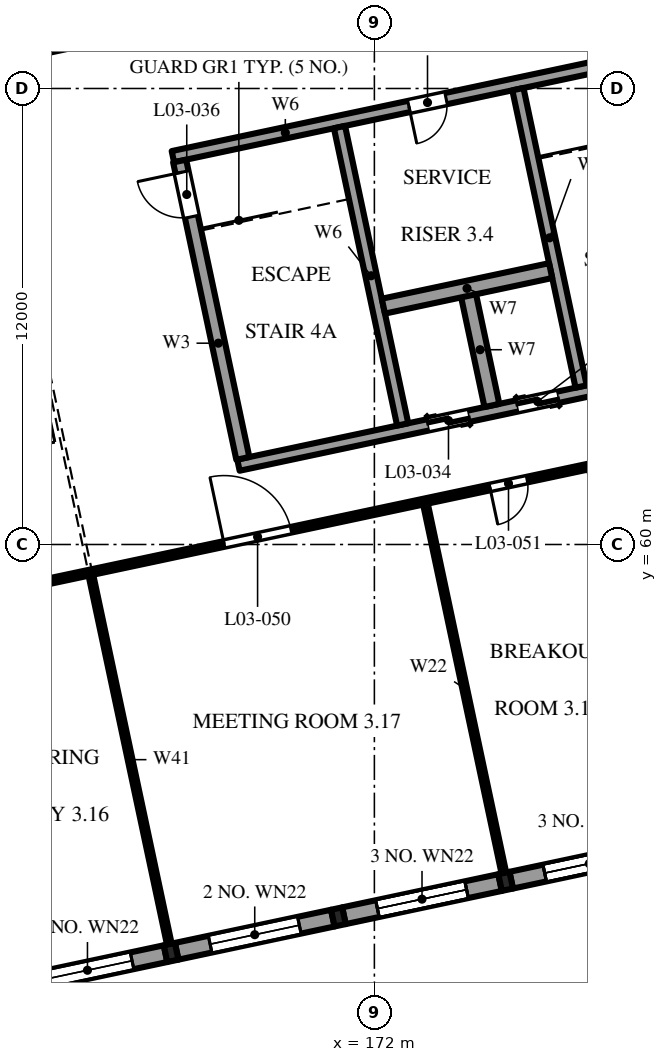
"""IFC4 building model, lengths in metres.
Left out: names, types, materials, properties, quantities, classifications, styles, units other than length and angle.
Written with IfcOpenShell. Run it as: python <this file> out.ifc"""

import sys

from ifc_helpers import new_model, si_unit, direction, frame, frame_2d, origin, origin_2d, place, context, subcontext, project, spatial, polyline, rectangle, i_section, outline, extrude, element, fill, save


model = new_model("IFC4")
c1 = context("Model", 3, precision=1e-05, world=origin(), true_north=direction((0.0, 1.0)))
c2 = subcontext(c1, "Body", "Model", "MODEL_VIEW")
j1 = project(units=[si_unit("LENGTHUNIT", "METRE"), si_unit("PLANEANGLEUNIT", "RADIAN")], contexts=[c1])
p1 = place(None, origin())
s1 = spatial("IfcSite", under=j1, at=p1, CompositionType="ELEMENT")
p2 = place(p1, origin())
s2 = spatial("IfcBuilding", under=s1, at=p2, CompositionType="ELEMENT")
p3 = place(p2, frame((0.0, 0.0, 16.8)))
s3 = spatial("IfcBuildingStorey", under=s2, at=p3, CompositionType="ELEMENT", Elevation=16.8)
for number, where, z_axis, x_axis in (
    (1, (166.651, 49.264, 0.0), (0.0, 0.0, 1.0), (0.978, 0.208, 0.0)),
    (2, (171.052, 50.199, 0.0), (0.0, 0.0, 1.0), (0.978, 0.208, 0.0)),
    (3, (175.454, 51.135, 0.0), (0.0, 0.0, 1.0), (0.978, 0.208, 0.0)),
):
    element("IfcColumn", number, at=place(p3, frame(where, z_axis=z_axis, x_axis=x_axis)), inside=s3, PredefinedType="COLUMN", context=c2, shape_type="SweptSolid", body=[
        extrude(i_section(OverallWidth=0.3, OverallDepth=0.45, WebThickness=0.014, FlangeThickness=0.026, FilletRadius=0.027, at=origin_2d()), origin(), (0.0, 0.0, 1.0), 4.8),
    ])
p4 = place(p3, frame((166.698, 70.206, 0.0), z_axis=(0.0, 0.0, 1.0), x_axis=(0.978147662755, 0.20791139903, 0.0)))
e4 = element("IfcWall", 4, at=p4, inside=s3, PredefinedType="SHEAR", context=c2, shape_type="SweptSolid", body=[
    extrude(outline(polyline([(0.0, 0.0), (13.7, 0.0), (13.7, 12.494), (0.0, 11.761), (0.0, 0.0)])), frame((0.0, 0.15, 0.0), z_axis=(0.0, -1.0, 0.0), x_axis=(1.0, 0.0, 0.0)), (0.0, 0.0, 1.0), 0.3),
])
p5 = place(p4, frame((6.35, 0.0, 0.0)))
e5 = element("IfcOpeningElement", 5, at=p5, cuts=e4, PredefinedType="OPENING", context=c2, shape_type="SweptSolid", body=[
    extrude(rectangle(XDim=1.0, YDim=2.1, at=frame_2d((0.5, 1.05))), frame((0.0, 0.16, 0.0), z_axis=(0.0, -1.0, 0.0), x_axis=(1.0, 0.0, 0.0)), (0.0, 0.0, 1.0), 0.32),
])
p6 = place(p3, frame((168.423, 62.087, 0.0), z_axis=(0.0, 0.0, 1.0), x_axis=(0.978147662755, 0.20791139903, 0.0)))
e6 = element("IfcWall", 6, at=p6, inside=s3, PredefinedType="SHEAR", context=c2, shape_type="SweptSolid", body=[
    extrude(outline(polyline([(0.0, 0.0), (13.7, 0.0), (13.7, 12.929), (0.0, 12.196), (0.0, 0.0)])), frame((0.0, 0.15, 0.0), z_axis=(0.0, -1.0, 0.0), x_axis=(1.0, 0.0, 0.0)), (0.0, 0.0, 1.0), 0.3),
])
p7 = place(p6, frame((5.1, 0.0, 0.0)))
e7 = element("IfcOpeningElement", 7, at=p7, cuts=e6, PredefinedType="OPENING", context=c2, shape_type="SweptSolid", body=[
    extrude(rectangle(XDim=1.1, YDim=2.1, at=frame_2d((0.55, 1.05))), frame((0.0, 0.16, 0.0), z_axis=(0.0, -1.0, 0.0), x_axis=(1.0, 0.0, 0.0)), (0.0, 0.0, 1.0), 0.32),
])
p8 = place(p6, frame((7.5, 0.0, 0.0)))
e8 = element("IfcOpeningElement", 8, at=p8, cuts=e6, PredefinedType="OPENING", context=c2, shape_type="SweptSolid", body=[
    extrude(rectangle(XDim=1.1, YDim=2.1, at=frame_2d((0.55, 1.05))), frame((0.0, 0.16, 0.0), z_axis=(0.0, -1.0, 0.0), x_axis=(1.0, 0.0, 0.0)), (0.0, 0.0, 1.0), 0.32),
])
p9 = place(p3, frame((166.876, 70.091, 0.0), z_axis=(0.0, 0.0, 1.0), x_axis=(0.207915693476, -0.978146749934, 0.0)))
e9 = element("IfcWall", 9, at=p9, inside=s3, PredefinedType="SOLIDWALL", context=c2, shape_type="SweptSolid", body=[
    extrude(outline(polyline([(0.0, 0.0), (8.0, 0.0), (8.0, 12.196), (0.0, 11.777), (0.0, 0.0)])), frame((0.0, 0.175, 0.0), z_axis=(0.0, -1.0, 0.0), x_axis=(1.0, 0.0, 0.0)), (0.0, 0.0, 1.0), 0.35),
])
p10 = place(p9, frame((0.3, 0.0, 0.0)))
e10 = element("IfcOpeningElement", 10, at=p10, cuts=e9, PredefinedType="OPENING", context=c2, shape_type="SweptSolid", body=[
    extrude(rectangle(XDim=1.2, YDim=2.1, at=frame_2d((0.6, 1.05))), frame((0.0, 0.185, 0.0), z_axis=(0.0, -1.0, 0.0), x_axis=(1.0, 0.0, 0.0)), (0.0, 0.0, 1.0), 0.37),
])
p11 = place(p3, frame((171.082, 70.985, 0.0), z_axis=(0.0, 0.0, 1.0), x_axis=(0.207915693476, -0.978146749934, 0.0)))
e11 = element("IfcWall", 11, at=p11, inside=s3, PredefinedType="SHEAR", context=c2, shape_type="SweptSolid", body=[
    extrude(outline(polyline([(0.0, 0.0), (8.0, 0.0), (8.0, 12.426), (0.0, 12.007), (0.0, 0.0)])), frame((0.0, 0.15, 0.0), z_axis=(0.0, -1.0, 0.0), x_axis=(1.0, 0.0, 0.0)), (0.0, 0.0, 1.0), 0.3),
])
p12 = place(p3, frame((175.777, 71.983, 0.0), z_axis=(0.0, 0.0, 1.0), x_axis=(0.207915693476, -0.978146749934, 0.0)))
e12 = element("IfcWall", 12, at=p12, inside=s3, PredefinedType="SHEAR", context=c2, shape_type="SweptSolid", body=[
    extrude(outline(polyline([(0.0, 0.0), (8.0, 0.0), (8.0, 12.683), (0.0, 12.264), (0.0, 0.0)])), frame((0.0, 0.15, 0.0), z_axis=(0.0, -1.0, 0.0), x_axis=(1.0, 0.0, 0.0)), (0.0, 0.0, 1.0), 0.3),
])
p13 = place(p3, frame((174.469, 66.593, 0.0), z_axis=(0.0, 0.0, 1.0), x_axis=(0.207933702079, -0.978142921837, 0.0)))
e13 = element("IfcWall", 13, at=p13, inside=s3, PredefinedType="SHEAR", context=c2, shape_type="SweptSolid", body=[
    extrude(outline(polyline([(0.0, 0.0), (3.0, 0.0), (3.0, 12.554), (0.0, 12.397), (0.0, 0.0)])), frame((0.0, 0.2, 0.0), z_axis=(0.0, -1.0, 0.0), x_axis=(1.0, 0.0, 0.0)), (0.0, 0.0, 1.0), 0.4),
])
p14 = place(p3, frame((172.237, 66.272, 0.0), z_axis=(0.0, 0.0, 1.0), x_axis=(0.978149611564, 0.20790223038, 0.0)))
e14 = element("IfcWall", 14, at=p14, inside=s3, PredefinedType="SHEAR", context=c2, shape_type="SweptSolid", body=[
    extrude(outline(polyline([(0.0, 0.0), (4.5, 0.0), (4.5, 12.51), (0.0, 12.269), (0.0, 0.0)])), frame((0.0, 0.2, 0.0), z_axis=(0.0, -1.0, 0.0), x_axis=(1.0, 0.0, 0.0)), (0.0, 0.0, 1.0), 0.4),
])
p15 = place(p3, frame((162.396, 48.359, 0.0), z_axis=(0.0, 0.0, 1.0), x_axis=(0.978155748334, 0.207873355681, 0.0)))
e15 = element("IfcWall", 15, at=p15, inside=s3, PredefinedType="SOLIDWALL", context=c2, shape_type="SweptSolid", body=[
    extrude(outline(polyline([(0.0, 0.0), (4.2, 0.0), (4.2, 13.89), (0.0, 13.666), (0.0, 0.0)])), frame((0.0, 0.225, 0.0), z_axis=(0.0, -1.0, 0.0), x_axis=(1.0, 0.0, 0.0)), (0.0, 0.0, 1.0), 0.45),
])
p16 = place(p15, frame((0.9, 0.0, 0.9)))
e16 = element("IfcOpeningElement", 16, at=p16, cuts=e15, PredefinedType="OPENING", context=c2, shape_type="SweptSolid", body=[
    extrude(rectangle(XDim=2.4, YDim=2.4, at=frame_2d((1.2, 1.2))), frame((0.0, 0.235, 0.0), z_axis=(0.0, -1.0, 0.0), x_axis=(1.0, 0.0, 0.0)), (0.0, 0.0, 1.0), 0.47),
])
p17 = place(p15, frame((0.9, 0.0, 5.1)))
e17 = element("IfcOpeningElement", 17, at=p17, cuts=e15, PredefinedType="OPENING", context=c2, shape_type="SweptSolid", body=[
    extrude(rectangle(XDim=2.4, YDim=2.4, at=frame_2d((1.2, 1.2))), frame((0.0, 0.235, 0.0), z_axis=(0.0, -1.0, 0.0), x_axis=(1.0, 0.0, 0.0)), (0.0, 0.0, 1.0), 0.47),
])
p18 = place(p3, frame((166.798, 49.295, 0.0), z_axis=(0.0, 0.0, 1.0), x_axis=(0.978143927149, 0.207928972925, 0.0)))
e18 = element("IfcWall", 18, at=p18, inside=s3, PredefinedType="SOLIDWALL", context=c2, shape_type="SweptSolid", body=[
    extrude(outline(polyline([(0.0, 0.0), (4.2, 0.0), (4.2, 14.131), (0.0, 13.906), (0.0, 0.0)])), frame((0.0, 0.225, 0.0), z_axis=(0.0, -1.0, 0.0), x_axis=(1.0, 0.0, 0.0)), (0.0, 0.0, 1.0), 0.45),
])
p19 = place(p18, frame((0.9, 0.0, 0.9)))
e19 = element("IfcOpeningElement", 19, at=p19, cuts=e18, PredefinedType="OPENING", context=c2, shape_type="SweptSolid", body=[
    extrude(rectangle(XDim=2.4, YDim=2.4, at=frame_2d((1.2, 1.2))), frame((0.0, 0.235, 0.0), z_axis=(0.0, -1.0, 0.0), x_axis=(1.0, 0.0, 0.0)), (0.0, 0.0, 1.0), 0.47),
])
p20 = place(p18, frame((0.9, 0.0, 5.1)))
e20 = element("IfcOpeningElement", 20, at=p20, cuts=e18, PredefinedType="OPENING", context=c2, shape_type="SweptSolid", body=[
    extrude(rectangle(XDim=2.4, YDim=2.4, at=frame_2d((1.2, 1.2))), frame((0.0, 0.235, 0.0), z_axis=(0.0, -1.0, 0.0), x_axis=(1.0, 0.0, 0.0)), (0.0, 0.0, 1.0), 0.47),
])
p21 = place(p3, frame((171.199, 50.23, 0.0), z_axis=(0.0, 0.0, 1.0), x_axis=(0.978146440129, 0.207917150959, 0.0)))
e21 = element("IfcWall", 21, at=p21, inside=s3, PredefinedType="SOLIDWALL", context=c2, shape_type="SweptSolid", body=[
    extrude(outline(polyline([(0.0, 0.0), (4.2, 0.0), (4.2, 14.372), (0.0, 14.147), (0.0, 0.0)])), frame((0.0, 0.225, 0.0), z_axis=(0.0, -1.0, 0.0), x_axis=(1.0, 0.0, 0.0)), (0.0, 0.0, 1.0), 0.45),
])
p22 = place(p21, frame((0.9, 0.0, 0.9)))
e22 = element("IfcOpeningElement", 22, at=p22, cuts=e21, PredefinedType="OPENING", context=c2, shape_type="SweptSolid", body=[
    extrude(rectangle(XDim=2.4, YDim=2.4, at=frame_2d((1.2, 1.2))), frame((0.0, 0.235, 0.0), z_axis=(0.0, -1.0, 0.0), x_axis=(1.0, 0.0, 0.0)), (0.0, 0.0, 1.0), 0.47),
])
p23 = place(p21, frame((0.9, 0.0, 5.1)))
e23 = element("IfcOpeningElement", 23, at=p23, cuts=e21, PredefinedType="OPENING", context=c2, shape_type="SweptSolid", body=[
    extrude(rectangle(XDim=2.4, YDim=2.4, at=frame_2d((1.2, 1.2))), frame((0.0, 0.235, 0.0), z_axis=(0.0, -1.0, 0.0), x_axis=(1.0, 0.0, 0.0)), (0.0, 0.0, 1.0), 0.47),
])
p24 = place(p21, frame((0.9, 0.0, 9.3)))
e24 = element("IfcOpeningElement", 24, at=p24, cuts=e21, PredefinedType="OPENING", context=c2, shape_type="SweptSolid", body=[
    extrude(rectangle(XDim=2.4, YDim=2.4, at=frame_2d((1.2, 1.2))), frame((0.0, 0.235, 0.0), z_axis=(0.0, -1.0, 0.0), x_axis=(1.0, 0.0, 0.0)), (0.0, 0.0, 1.0), 0.47),
])
p25 = place(p3, frame((175.601, 51.166, 0.0), z_axis=(0.0, 0.0, 1.0), x_axis=(0.978143927149, 0.207928972925, 0.0)))
e25 = element("IfcWall", 25, at=p25, inside=s3, PredefinedType="SOLIDWALL", context=c2, shape_type="SweptSolid", body=[
    extrude(outline(polyline([(0.0, 0.0), (4.2, 0.0), (4.2, 14.613), (0.0, 14.388), (0.0, 0.0)])), frame((0.0, 0.225, 0.0), z_axis=(0.0, -1.0, 0.0), x_axis=(1.0, 0.0, 0.0)), (0.0, 0.0, 1.0), 0.45),
])
p26 = place(p25, frame((0.9, 0.0, 0.9)))
e26 = element("IfcOpeningElement", 26, at=p26, cuts=e25, PredefinedType="OPENING", context=c2, shape_type="SweptSolid", body=[
    extrude(rectangle(XDim=2.4, YDim=2.4, at=frame_2d((1.2, 1.2))), frame((0.0, 0.235, 0.0), z_axis=(0.0, -1.0, 0.0), x_axis=(1.0, 0.0, 0.0)), (0.0, 0.0, 1.0), 0.47),
])
p27 = place(p25, frame((0.9, 0.0, 5.1)))
e27 = element("IfcOpeningElement", 27, at=p27, cuts=e25, PredefinedType="OPENING", context=c2, shape_type="SweptSolid", body=[
    extrude(rectangle(XDim=2.4, YDim=2.4, at=frame_2d((1.2, 1.2))), frame((0.0, 0.235, 0.0), z_axis=(0.0, -1.0, 0.0), x_axis=(1.0, 0.0, 0.0)), (0.0, 0.0, 1.0), 0.47),
])
p28 = place(p25, frame((0.9, 0.0, 9.3)))
e28 = element("IfcOpeningElement", 28, at=p28, cuts=e25, PredefinedType="OPENING", context=c2, shape_type="SweptSolid", body=[
    extrude(rectangle(XDim=2.4, YDim=2.4, at=frame_2d((1.2, 1.2))), frame((0.0, 0.235, 0.0), z_axis=(0.0, -1.0, 0.0), x_axis=(1.0, 0.0, 0.0)), (0.0, 0.0, 1.0), 0.47),
])
p29 = place(p3, frame((161.808, 72.771, 0.0), z_axis=(0.0, 0.0, 1.0), x_axis=(0.978155748334, 0.207873355681, 0.0)))
e29 = element("IfcWall", 29, at=p29, inside=s3, PredefinedType="SOLIDWALL", context=c2, shape_type="SweptSolid", body=[
    extrude(outline(polyline([(0.0, 0.0), (4.2, 0.0), (4.2, 12.874), (0.0, 12.649), (0.0, 0.0)])), frame((0.0, 0.175, 0.0), z_axis=(0.0, -1.0, 0.0), x_axis=(1.0, 0.0, 0.0)), (0.0, 0.0, 1.0), 0.35),
])
p30 = place(p3, frame((151.32, 56.458, 0.0), z_axis=(0.0, 0.0, 1.0), x_axis=(0.97814787394, 0.207910405482, 0.0)))
e30 = element("IfcWall", 30, at=p30, inside=s3, PredefinedType="PARTITIONING", context=c2, shape_type="SweptSolid", body=[
    extrude(outline(polyline([(0.0, 0.0), (45.0, 0.0), (45.0, 12.948), (0.0, 10.54), (0.0, 0.0)])), frame((0.0, 0.075, 0.0), z_axis=(0.0, -1.0, 0.0), x_axis=(1.0, 0.0, 0.0)), (0.0, 0.0, 1.0), 0.15),
])
p31 = place(p30, frame((3.6, 0.0, 0.0)))
e31 = element("IfcOpeningElement", 31, at=p31, cuts=e30, PredefinedType="OPENING", context=c2, shape_type="SweptSolid", body=[
    extrude(rectangle(XDim=1.8, YDim=2.1, at=frame_2d((0.9, 1.05))), frame((0.0, 0.085, 0.0), z_axis=(0.0, -1.0, 0.0), x_axis=(1.0, 0.0, 0.0)), (0.0, 0.0, 1.0), 0.17),
])
p32 = place(p30, frame((10.75, 0.0, 0.0)))
e32 = element("IfcOpeningElement", 32, at=p32, cuts=e30, PredefinedType="OPENING", context=c2, shape_type="SweptSolid", body=[
    extrude(rectangle(XDim=1.0, YDim=2.1, at=frame_2d((0.5, 1.05))), frame((0.0, 0.085, 0.0), z_axis=(0.0, -1.0, 0.0), x_axis=(1.0, 0.0, 0.0)), (0.0, 0.0, 1.0), 0.17),
])
p33 = place(p30, frame((17.1, 0.0, 0.0)))
e33 = element("IfcOpeningElement", 33, at=p33, cuts=e30, PredefinedType="OPENING", context=c2, shape_type="SweptSolid", body=[
    extrude(rectangle(XDim=1.8, YDim=2.1, at=frame_2d((0.9, 1.05))), frame((0.0, 0.085, 0.0), z_axis=(0.0, -1.0, 0.0), x_axis=(1.0, 0.0, 0.0)), (0.0, 0.0, 1.0), 0.17),
])
p34 = place(p30, frame((24.25, 0.0, 0.0)))
e34 = element("IfcOpeningElement", 34, at=p34, cuts=e30, PredefinedType="OPENING", context=c2, shape_type="SweptSolid", body=[
    extrude(rectangle(XDim=1.0, YDim=2.1, at=frame_2d((0.5, 1.05))), frame((0.0, 0.085, 0.0), z_axis=(0.0, -1.0, 0.0), x_axis=(1.0, 0.0, 0.0)), (0.0, 0.0, 1.0), 0.17),
])
p35 = place(p30, frame((30.75, 0.0, 0.0)))
e35 = element("IfcOpeningElement", 35, at=p35, cuts=e30, PredefinedType="OPENING", context=c2, shape_type="SweptSolid", body=[
    extrude(rectangle(XDim=1.5, YDim=2.1, at=frame_2d((0.75, 1.05))), frame((0.0, 0.085, 0.0), z_axis=(0.0, -1.0, 0.0), x_axis=(1.0, 0.0, 0.0)), (0.0, 0.0, 1.0), 0.17),
])
p36 = place(p30, frame((39.6, 0.0, 0.0)))
e36 = element("IfcOpeningElement", 36, at=p36, cuts=e30, PredefinedType="OPENING", context=c2, shape_type="SweptSolid", body=[
    extrude(rectangle(XDim=1.8, YDim=2.1, at=frame_2d((0.9, 1.05))), frame((0.0, 0.085, 0.0), z_axis=(0.0, -1.0, 0.0), x_axis=(1.0, 0.0, 0.0)), (0.0, 0.0, 1.0), 0.17),
])
p37 = place(p3, frame((166.604, 49.484, 0.0), z_axis=(0.0, 0.0, 1.0), x_axis=(-0.207932893358, 0.978143093754, 0.0)))
e37 = element("IfcWall", 37, at=p37, inside=s3, PredefinedType="PARTITIONING", context=c2, shape_type="SweptSolid", body=[
    extrude(outline(polyline([(0.0, 0.0), (9.925, 0.0), (9.925, 10.548), (0.0, 10.548), (0.0, 0.0)])), frame((0.0, 0.062, 0.0), z_axis=(0.0, -1.0, 0.0), x_axis=(1.0, 0.0, 0.0)), (0.0, 0.0, 1.0), 0.125),
])
p38 = place(p3, frame((175.407, 51.355, 0.0), z_axis=(0.0, 0.0, 1.0), x_axis=(-0.20790935802, 0.978148096582, 0.0)))
e38 = element("IfcWall", 38, at=p38, inside=s3, PredefinedType="PARTITIONING", context=c2, shape_type="SweptSolid", body=[
    extrude(outline(polyline([(0.0, 0.0), (9.925, 0.0), (9.925, 11.748), (0.0, 11.949), (0.0, 0.0)])), frame((0.0, 0.062, 0.0), z_axis=(0.0, -1.0, 0.0), x_axis=(1.0, 0.0, 0.0)), (0.0, 0.0, 1.0), 0.125),
])
p39 = place(p16, origin())
e39 = element("IfcWindow", 39, at=p39, inside=s3, PartitioningType="SINGLE_PANEL", PredefinedType="WINDOW", context=c2, shape_type="SweptSolid", body=[
    extrude(rectangle(XDim=2.4, YDim=2.4, at=frame_2d((1.2, 1.2))), frame((0.0, 0.03, 0.0), z_axis=(0.0, -1.0, 0.0), x_axis=(1.0, 0.0, 0.0)), (0.0, 0.0, 1.0), 0.06),
])
fill(e16, e39)
p40 = place(p17, origin())
e40 = element("IfcWindow", 40, at=p40, inside=s3, PartitioningType="SINGLE_PANEL", PredefinedType="WINDOW", context=c2, shape_type="SweptSolid", body=[
    extrude(rectangle(XDim=2.4, YDim=2.4, at=frame_2d((1.2, 1.2))), frame((0.0, 0.03, 0.0), z_axis=(0.0, -1.0, 0.0), x_axis=(1.0, 0.0, 0.0)), (0.0, 0.0, 1.0), 0.06),
])
fill(e17, e40)
p41 = place(p19, origin())
e41 = element("IfcWindow", 41, at=p41, inside=s3, PartitioningType="SINGLE_PANEL", PredefinedType="WINDOW", context=c2, shape_type="SweptSolid", body=[
    extrude(rectangle(XDim=2.4, YDim=2.4, at=frame_2d((1.2, 1.2))), frame((0.0, 0.03, 0.0), z_axis=(0.0, -1.0, 0.0), x_axis=(1.0, 0.0, 0.0)), (0.0, 0.0, 1.0), 0.06),
])
fill(e19, e41)
p42 = place(p20, origin())
e42 = element("IfcWindow", 42, at=p42, inside=s3, PartitioningType="SINGLE_PANEL", PredefinedType="WINDOW", context=c2, shape_type="SweptSolid", body=[
    extrude(rectangle(XDim=2.4, YDim=2.4, at=frame_2d((1.2, 1.2))), frame((0.0, 0.03, 0.0), z_axis=(0.0, -1.0, 0.0), x_axis=(1.0, 0.0, 0.0)), (0.0, 0.0, 1.0), 0.06),
])
fill(e20, e42)
p43 = place(p22, origin())
e43 = element("IfcWindow", 43, at=p43, inside=s3, PartitioningType="SINGLE_PANEL", PredefinedType="WINDOW", context=c2, shape_type="SweptSolid", body=[
    extrude(rectangle(XDim=2.4, YDim=2.4, at=frame_2d((1.2, 1.2))), frame((0.0, 0.03, 0.0), z_axis=(0.0, -1.0, 0.0), x_axis=(1.0, 0.0, 0.0)), (0.0, 0.0, 1.0), 0.06),
])
fill(e22, e43)
p44 = place(p23, origin())
e44 = element("IfcWindow", 44, at=p44, inside=s3, PartitioningType="SINGLE_PANEL", PredefinedType="WINDOW", context=c2, shape_type="SweptSolid", body=[
    extrude(rectangle(XDim=2.4, YDim=2.4, at=frame_2d((1.2, 1.2))), frame((0.0, 0.03, 0.0), z_axis=(0.0, -1.0, 0.0), x_axis=(1.0, 0.0, 0.0)), (0.0, 0.0, 1.0), 0.06),
])
fill(e23, e44)
p45 = place(p24, origin())
e45 = element("IfcWindow", 45, at=p45, inside=s3, PartitioningType="SINGLE_PANEL", PredefinedType="WINDOW", context=c2, shape_type="SweptSolid", body=[
    extrude(rectangle(XDim=2.4, YDim=2.4, at=frame_2d((1.2, 1.2))), frame((0.0, 0.03, 0.0), z_axis=(0.0, -1.0, 0.0), x_axis=(1.0, 0.0, 0.0)), (0.0, 0.0, 1.0), 0.06),
])
fill(e24, e45)
p46 = place(p26, origin())
e46 = element("IfcWindow", 46, at=p46, inside=s3, PartitioningType="SINGLE_PANEL", PredefinedType="WINDOW", context=c2, shape_type="SweptSolid", body=[
    extrude(rectangle(XDim=2.4, YDim=2.4, at=frame_2d((1.2, 1.2))), frame((0.0, 0.03, 0.0), z_axis=(0.0, -1.0, 0.0), x_axis=(1.0, 0.0, 0.0)), (0.0, 0.0, 1.0), 0.06),
])
fill(e26, e46)
p47 = place(p27, origin())
e47 = element("IfcWindow", 47, at=p47, inside=s3, PartitioningType="SINGLE_PANEL", PredefinedType="WINDOW", context=c2, shape_type="SweptSolid", body=[
    extrude(rectangle(XDim=2.4, YDim=2.4, at=frame_2d((1.2, 1.2))), frame((0.0, 0.03, 0.0), z_axis=(0.0, -1.0, 0.0), x_axis=(1.0, 0.0, 0.0)), (0.0, 0.0, 1.0), 0.06),
])
fill(e27, e47)
p48 = place(p28, origin())
e48 = element("IfcWindow", 48, at=p48, inside=s3, PartitioningType="SINGLE_PANEL", PredefinedType="WINDOW", context=c2, shape_type="SweptSolid", body=[
    extrude(rectangle(XDim=2.4, YDim=2.4, at=frame_2d((1.2, 1.2))), frame((0.0, 0.03, 0.0), z_axis=(0.0, -1.0, 0.0), x_axis=(1.0, 0.0, 0.0)), (0.0, 0.0, 1.0), 0.06),
])
fill(e28, e48)
p49 = place(p7, frame((1.1, 0.0, 0.0), z_axis=(0.0, 0.0, 1.0), x_axis=(-1.0, 0.0, 0.0)))
e49 = element("IfcDoor", 49, at=p49, inside=s3, OperationType="DOUBLE_DOOR_SLIDING", PredefinedType="DOOR", context=c2, shape_type="SweptSolid", body=[
    extrude(rectangle(XDim=1.1, YDim=2.1, at=frame_2d((0.55, 1.05))), frame((0.0, 0.025, 0.0), z_axis=(0.0, -1.0, 0.0), x_axis=(1.0, 0.0, 0.0)), (0.0, 0.0, 1.0), 0.05),
])
fill(e7, e49)
p50 = place(p8, frame((1.1, 0.0, 0.0), z_axis=(0.0, 0.0, 1.0), x_axis=(-1.0, 0.0, 0.0)))
e50 = element("IfcDoor", 50, at=p50, inside=s3, OperationType="DOUBLE_DOOR_SLIDING", PredefinedType="DOOR", context=c2, shape_type="SweptSolid", body=[
    extrude(rectangle(XDim=1.1, YDim=2.1, at=frame_2d((0.55, 1.05))), frame((0.0, 0.025, 0.0), z_axis=(0.0, -1.0, 0.0), x_axis=(1.0, 0.0, 0.0)), (0.0, 0.0, 1.0), 0.05),
])
fill(e8, e50)
p51 = place(p10, frame((1.2, 0.0, 0.0), z_axis=(0.0, 0.0, 1.0), x_axis=(-1.0, 0.0, 0.0)))
e51 = element("IfcDoor", 51, at=p51, inside=s3, OperationType="SINGLE_SWING_RIGHT", PredefinedType="DOOR", context=c2, shape_type="SweptSolid", body=[
    extrude(rectangle(XDim=1.2, YDim=2.1, at=frame_2d((0.6, 1.05))), frame((0.0, 0.025, 0.0), z_axis=(0.0, -1.0, 0.0), x_axis=(1.0, 0.0, 0.0)), (0.0, 0.0, 1.0), 0.05),
])
fill(e10, e51)
p52 = place(p5, frame((1.0, 0.0, 0.0), z_axis=(0.0, 0.0, 1.0), x_axis=(-1.0, 0.0, 0.0)))
e52 = element("IfcDoor", 52, at=p52, inside=s3, OperationType="SINGLE_SWING_LEFT", PredefinedType="DOOR", context=c2, shape_type="SweptSolid", body=[
    extrude(rectangle(XDim=1.0, YDim=2.1, at=frame_2d((0.5, 1.05))), frame((0.0, 0.025, 0.0), z_axis=(0.0, -1.0, 0.0), x_axis=(1.0, 0.0, 0.0)), (0.0, 0.0, 1.0), 0.05),
])
fill(e5, e52)
p53 = place(p33, origin())
e53 = element("IfcDoor", 53, at=p53, inside=s3, OperationType="DOUBLE_DOOR_SINGLE_SWING", PredefinedType="DOOR", context=c2, shape_type="SweptSolid", body=[
    extrude(rectangle(XDim=1.8, YDim=2.1, at=frame_2d((0.9, 1.05))), frame((0.0, 0.025, 0.0), z_axis=(0.0, -1.0, 0.0), x_axis=(1.0, 0.0, 0.0)), (0.0, 0.0, 1.0), 0.05),
])
fill(e33, e53)
p54 = place(p34, frame((1.0, 0.0, 0.0), z_axis=(0.0, 0.0, 1.0), x_axis=(-1.0, 0.0, 0.0)))
e54 = element("IfcDoor", 54, at=p54, inside=s3, OperationType="SINGLE_SWING_LEFT", PredefinedType="DOOR", context=c2, shape_type="SweptSolid", body=[
    extrude(rectangle(XDim=1.0, YDim=2.1, at=frame_2d((0.5, 1.05))), frame((0.0, 0.025, 0.0), z_axis=(0.0, -1.0, 0.0), x_axis=(1.0, 0.0, 0.0)), (0.0, 0.0, 1.0), 0.05),
])
fill(e34, e54)
save(model, sys.argv[1])
